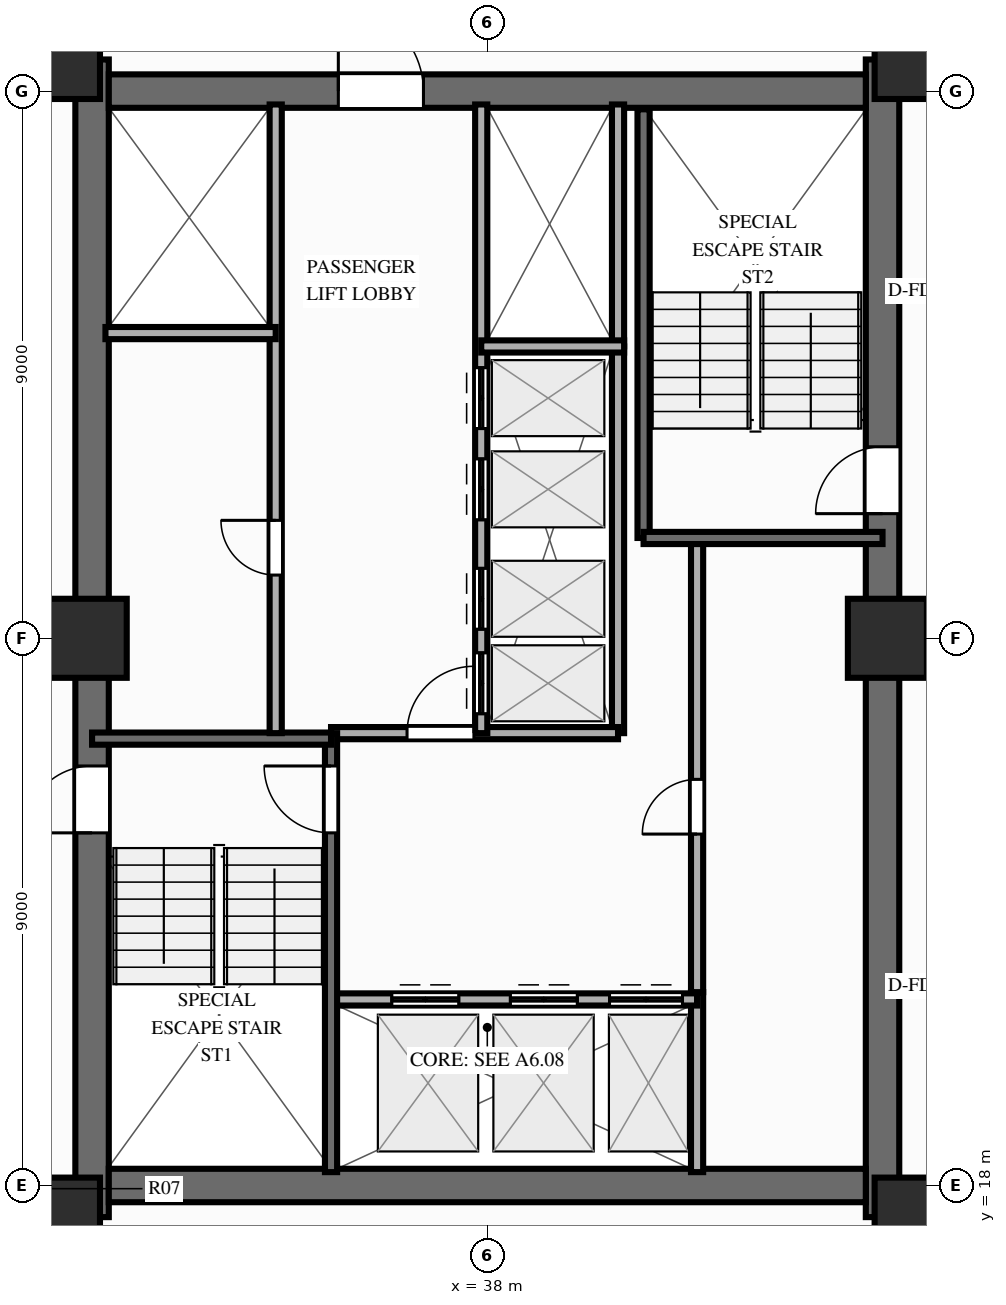
"""IFC4 building model, lengths in metres.
Left out: names, types, materials, properties, quantities, classifications, styles, units other than length and angle.
Written with IfcOpenShell. Run it as: python <this file> out.ifc"""

import sys

from ifc_helpers import new_model, si_unit, direction, frame, frame_2d, origin, origin_2d, place, context, subcontext, project, spatial, rectangle, extrude, source, transform, mapped, element, fill, save


model = new_model("IFC4")
c1 = context("Model", 3, precision=1e-05, world=origin(), true_north=direction((0.0, 1.0)))
c2 = subcontext(c1, "Body", "Model", "MODEL_VIEW")
j1 = project(units=[si_unit("LENGTHUNIT", "METRE"), si_unit("PLANEANGLEUNIT", "RADIAN")], contexts=[c1])
p1 = place(None, origin())
s1 = spatial("IfcSite", under=j1, at=p1, CompositionType="ELEMENT")
p2 = place(p1, origin())
s2 = spatial("IfcBuilding", under=s1, at=p2, CompositionType="ELEMENT")
p3 = place(p2, frame((0.0, 0.0, 135.75)))
s3 = spatial("IfcBuildingStorey", under=s2, at=p3, CompositionType="ELEMENT", Elevation=135.75)
p4 = place(p3, frame((31.5, 17.48, 0.0), z_axis=(0.0, 0.0, 1.0), x_axis=(0.0, 1.0, 0.0)))
e1 = element("IfcWall", 1, at=p4, inside=s3, PredefinedType="SHEAR", context=c2, shape_type="SweptSolid", body=[
    extrude(rectangle(XDim=19.04, YDim=0.55, at=frame_2d((9.52, 0.0))), origin(), (0.0, 0.0, 1.0), 3.0),
])
p5 = place(p4, frame((6.32, 0.0, 0.0)))
e2 = element("IfcOpeningElement", 2, at=p5, cuts=e1, PredefinedType="OPENING", context=c2, shape_type="SweptSolid", body=[
    extrude(rectangle(XDim=1.1, YDim=2.15, at=frame_2d((0.55, 1.075))), frame((0.0, 0.287, 0.0), z_axis=(0.0, -1.0, 0.0), x_axis=(1.0, 0.0, 0.0)), (0.0, 0.0, 1.0), 0.574),
])
p6 = place(p3, frame((44.5, 17.48, 0.0), z_axis=(0.0, 0.0, 1.0), x_axis=(0.0, 1.0, 0.0)))
e3 = element("IfcWall", 3, at=p6, inside=s3, PredefinedType="SHEAR", context=c2, shape_type="SweptSolid", body=[
    extrude(rectangle(XDim=19.04, YDim=0.55, at=frame_2d((9.52, 0.0))), origin(), (0.0, 0.0, 1.0), 3.0),
])
p7 = place(p6, frame((12.67, 0.0, 0.0), z_axis=(0.0, 0.0, 1.0), x_axis=(-1.0, 0.0, 0.0)))
e4 = element("IfcOpeningElement", 4, at=p7, cuts=e3, PredefinedType="OPENING", context=c2, shape_type="SweptSolid", body=[
    extrude(rectangle(XDim=1.1, YDim=2.15, at=frame_2d((0.55, 1.075))), frame((0.0, 0.287, 0.0), z_axis=(0.0, -1.0, 0.0), x_axis=(1.0, 0.0, 0.0)), (0.0, 0.0, 1.0), 0.574),
])
p8 = place(p3, frame((31.775, 18.0, 0.0), z_axis=(0.0, 0.0, 1.0), x_axis=(1.0, 0.0, 0.0)))
e5 = element("IfcWall", 5, at=p8, inside=s3, PredefinedType="SHEAR", context=c2, shape_type="SweptSolid", body=[
    extrude(rectangle(XDim=12.45, YDim=0.55, at=frame_2d((6.225, 0.0))), origin(), (0.0, 0.0, 1.0), 3.0),
])
p9 = place(p3, frame((31.775, 36.0, 0.0), z_axis=(0.0, 0.0, 1.0), x_axis=(1.0, 0.0, 0.0)))
e6 = element("IfcWall", 6, at=p9, inside=s3, PredefinedType="SHEAR", context=c2, shape_type="SweptSolid", body=[
    extrude(rectangle(XDim=12.45, YDim=0.55, at=frame_2d((6.225, 0.0))), origin(), (0.0, 0.0, 1.0), 3.0),
])
p10 = place(p9, frame((5.175, 0.0, 0.0), z_axis=(0.0, 0.0, 1.0), x_axis=(-1.0, 0.0, 0.0)))
e7 = element("IfcOpeningElement", 7, at=p10, cuts=e6, PredefinedType="OPENING", context=c2, shape_type="SweptSolid", body=[
    extrude(rectangle(XDim=1.4, YDim=2.15, at=frame_2d((0.7, 1.075))), frame((0.0, 0.287, 0.0), z_axis=(0.0, -1.0, 0.0), x_axis=(1.0, 0.0, 0.0)), (0.0, 0.0, 1.0), 0.574),
])
m1 = source(origin(), c2, "Body", "SweptSolid", [
    extrude(rectangle(XDim=1.3, YDim=1.3, at=origin_2d()), origin(), (0.0, 0.0, 1.0), 3.0),
])
for number, where, z_axis, x_axis in (
    (8, (30.98, 17.48, 0.0), (0.0, 0.0, 1.0), (1.0, 0.0, 0.0)),
    (9, (45.02, 17.48, 0.0), (0.0, 0.0, 1.0), (1.0, 0.0, 0.0)),
    (10, (30.98, 36.52, 0.0), (0.0, 0.0, 1.0), (1.0, 0.0, 0.0)),
    (11, (45.02, 36.52, 0.0), (0.0, 0.0, 1.0), (1.0, 0.0, 0.0)),
    (12, (31.42, 27.0, 0.0), (0.0, 0.0, 1.0), (1.0, 0.0, 0.0)),
    (13, (44.58, 27.0, 0.0), (0.0, 0.0, 1.0), (1.0, 0.0, 0.0)),
):
    element("IfcColumn", number, at=place(p3, frame(where, z_axis=z_axis, x_axis=x_axis)), inside=s3, PredefinedType="COLUMN", context=c2, shape_type="MappedRepresentation", body=[
        mapped(m1, transform((0.0, 0.0, 0.0), scale=1.0)),
    ])
p11 = place(p3, frame((41.45, 18.22, 0.0), z_axis=(0.0, 0.0, 1.0), x_axis=(0.0, 1.0, 0.0)))
e14 = element("IfcWall", 14, at=p11, inside=s3, PredefinedType="PARTITIONING", context=c2, shape_type="SweptSolid", body=[
    extrude(rectangle(XDim=2.96, YDim=0.2, at=frame_2d((1.48, 0.0))), origin(), (0.0, 0.0, 1.0), 2.79),
])
p12 = place(p3, frame((41.45, 21.18, 0.0), z_axis=(0.0, 0.0, 1.0), x_axis=(0.0, 1.0, 0.0)))
e15 = element("IfcWall", 15, at=p12, inside=s3, PredefinedType="PARTITIONING", context=c2, shape_type="SweptSolid", body=[
    extrude(rectangle(XDim=7.42, YDim=0.2, at=frame_2d((3.71, 0.0))), origin(), (0.0, 0.0, 1.0), 2.79),
])
p13 = place(p12, frame((2.6, 0.0, 0.0)))
e16 = element("IfcOpeningElement", 16, at=p13, cuts=e15, PredefinedType="OPENING", context=c2, shape_type="SweptSolid", body=[
    extrude(rectangle(XDim=0.9, YDim=2.1, at=frame_2d((0.45, 1.05))), frame((0.0, 0.112, 0.0), z_axis=(0.0, -1.0, 0.0), x_axis=(1.0, 0.0, 0.0)), (0.0, 0.0, 1.0), 0.224),
])
p14 = place(p3, frame((40.15, 25.44, 0.0), z_axis=(0.0, 0.0, 1.0), x_axis=(0.0, 1.0, 0.0)))
e17 = element("IfcWall", 17, at=p14, inside=s3, PredefinedType="PARTITIONING", context=c2, shape_type="SweptSolid", body=[
    extrude(rectangle(XDim=6.36, YDim=0.2, at=frame_2d((3.18, 0.0))), origin(), (0.0, 0.0, 1.0), 2.79),
])
p15 = place(p3, frame((40.15, 31.8, 0.0), z_axis=(0.0, 0.0, 1.0), x_axis=(0.0, 1.0, 0.0)))
e18 = element("IfcWall", 18, at=p15, inside=s3, PredefinedType="PARTITIONING", context=c2, shape_type="SweptSolid", body=[
    extrude(rectangle(XDim=3.98, YDim=0.2, at=frame_2d((1.99, 0.0))), origin(), (0.0, 0.0, 1.0), 2.79),
])
p16 = place(p3, frame((35.43, 21.06, 0.0), z_axis=(0.0, 0.0, 1.0), x_axis=(1.0, 0.0, 0.0)))
e19 = element("IfcWall", 19, at=p16, inside=s3, PredefinedType="PARTITIONING", context=c2, shape_type="SweptSolid", body=[
    extrude(rectangle(XDim=6.02, YDim=0.2, at=frame_2d((3.01, 0.0))), origin(), (0.0, 0.0, 1.0), 2.79),
])
p17 = place(p16, frame((1.0, 0.0, 0.0)))
e20 = element("IfcOpeningElement", 20, at=p17, cuts=e19, PredefinedType="OPENING", context=c2, shape_type="SweptSolid", body=[
    extrude(rectangle(XDim=1.1, YDim=2.15, at=frame_2d((0.55, 1.075))), frame((0.0, 0.112, 0.0), z_axis=(0.0, -1.0, 0.0), x_axis=(1.0, 0.0, 0.0)), (0.0, 0.0, 1.0), 0.224),
])
p18 = place(p16, frame((2.95, 0.0, 0.0)))
e21 = element("IfcOpeningElement", 21, at=p18, cuts=e19, PredefinedType="OPENING", context=c2, shape_type="SweptSolid", body=[
    extrude(rectangle(XDim=1.1, YDim=2.15, at=frame_2d((0.55, 1.075))), frame((0.0, 0.112, 0.0), z_axis=(0.0, -1.0, 0.0), x_axis=(1.0, 0.0, 0.0)), (0.0, 0.0, 1.0), 0.224),
])
p19 = place(p16, frame((4.58, 0.0, 0.0)))
e22 = element("IfcOpeningElement", 22, at=p19, cuts=e19, PredefinedType="OPENING", context=c2, shape_type="SweptSolid", body=[
    extrude(rectangle(XDim=1.2, YDim=2.15, at=frame_2d((0.6, 1.075))), frame((0.0, 0.112, 0.0), z_axis=(0.0, -1.0, 0.0), x_axis=(1.0, 0.0, 0.0)), (0.0, 0.0, 1.0), 0.224),
])
p20 = place(p3, frame((35.43, 25.44, 0.0), z_axis=(0.0, 0.0, 1.0), x_axis=(1.0, 0.0, 0.0)))
e23 = element("IfcWall", 23, at=p20, inside=s3, PredefinedType="PARTITIONING", context=c2, shape_type="SweptSolid", body=[
    extrude(rectangle(XDim=4.72, YDim=0.2, at=frame_2d((2.36, 0.0))), origin(), (0.0, 0.0, 1.0), 2.79),
])
p21 = place(p20, frame((1.25, 0.0, 0.0)))
e24 = element("IfcOpeningElement", 24, at=p21, cuts=e23, PredefinedType="OPENING", context=c2, shape_type="SweptSolid", body=[
    extrude(rectangle(XDim=1.1, YDim=2.15, at=frame_2d((0.55, 1.075))), frame((0.0, 0.112, 0.0), z_axis=(0.0, -1.0, 0.0), x_axis=(1.0, 0.0, 0.0)), (0.0, 0.0, 1.0), 0.224),
])
p22 = place(p3, frame((35.43, 18.22, 0.0), z_axis=(0.0, 0.0, 1.0), x_axis=(0.0, 1.0, 0.0)))
e25 = element("IfcWall", 25, at=p22, inside=s3, PredefinedType="SOLIDWALL", context=c2, shape_type="SweptSolid", body=[
    extrude(rectangle(XDim=7.22, YDim=0.2, at=frame_2d((3.61, 0.0))), origin(), (0.0, 0.0, 1.0), 2.79),
])
p23 = place(p22, frame((6.68, 0.0, 0.0), z_axis=(0.0, 0.0, 1.0), x_axis=(-1.0, 0.0, 0.0)))
e26 = element("IfcOpeningElement", 26, at=p23, cuts=e25, PredefinedType="OPENING", context=c2, shape_type="SweptSolid", body=[
    extrude(rectangle(XDim=1.1, YDim=2.15, at=frame_2d((0.55, 1.075))), frame((0.0, 0.112, 0.0), z_axis=(0.0, -1.0, 0.0), x_axis=(1.0, 0.0, 0.0)), (0.0, 0.0, 1.0), 0.224),
])
p24 = place(p3, frame((31.5, 25.35, 0.0), z_axis=(0.0, 0.0, 1.0), x_axis=(1.0, 0.0, 0.0)))
e27 = element("IfcWall", 27, at=p24, inside=s3, PredefinedType="SOLIDWALL", context=c2, shape_type="SweptSolid", body=[
    extrude(rectangle(XDim=3.93, YDim=0.2, at=frame_2d((1.965, 0.0))), origin(), (0.0, 0.0, 1.0), 2.79),
])
p25 = place(p3, frame((40.57, 28.65, 0.0), z_axis=(0.0, 0.0, 1.0), x_axis=(0.0, 1.0, 0.0)))
e28 = element("IfcWall", 28, at=p25, inside=s3, PredefinedType="SOLIDWALL", context=c2, shape_type="SweptSolid", body=[
    extrude(rectangle(XDim=7.05, YDim=0.2, at=frame_2d((3.525, 0.0))), origin(), (0.0, 0.0, 1.0), 2.79),
])
p26 = place(p3, frame((40.57, 28.65, 0.0), z_axis=(0.0, 0.0, 1.0), x_axis=(1.0, 0.0, 0.0)))
e29 = element("IfcWall", 29, at=p26, inside=s3, PredefinedType="SOLIDWALL", context=c2, shape_type="SweptSolid", body=[
    extrude(rectangle(XDim=3.93, YDim=0.2, at=frame_2d((1.965, 0.0))), origin(), (0.0, 0.0, 1.0), 2.79),
])
p27 = place(p3, frame((34.52, 25.44, 0.0), z_axis=(0.0, 0.0, 1.0), x_axis=(0.0, 1.0, 0.0)))
e30 = element("IfcWall", 30, at=p27, inside=s3, PredefinedType="PARTITIONING", context=c2, shape_type="SweptSolid", body=[
    extrude(rectangle(XDim=10.34, YDim=0.2, at=frame_2d((5.17, 0.0))), origin(), (0.0, 0.0, 1.0), 2.79),
])
p28 = place(p27, frame((2.6, 0.0, 0.0)))
e31 = element("IfcOpeningElement", 31, at=p28, cuts=e30, PredefinedType="OPENING", context=c2, shape_type="SweptSolid", body=[
    extrude(rectangle(XDim=0.9, YDim=2.1, at=frame_2d((0.45, 1.05))), frame((0.0, 0.112, 0.0), z_axis=(0.0, -1.0, 0.0), x_axis=(1.0, 0.0, 0.0)), (0.0, 0.0, 1.0), 0.224),
])
p29 = place(p3, frame((31.72, 32.02, 0.0), z_axis=(0.0, 0.0, 1.0), x_axis=(1.0, 0.0, 0.0)))
e32 = element("IfcWall", 32, at=p29, inside=s3, PredefinedType="PARTITIONING", context=c2, shape_type="SweptSolid", body=[
    extrude(rectangle(XDim=2.8, YDim=0.2, at=frame_2d((1.4, 0.0))), origin(), (0.0, 0.0, 1.0), 2.79),
])
p30 = place(p3, frame((37.9, 25.44, 0.0), z_axis=(0.0, 0.0, 1.0), x_axis=(0.0, 1.0, 0.0)))
e33 = element("IfcWall", 33, at=p30, inside=s3, PredefinedType="PARTITIONING", context=c2, shape_type="SweptSolid", body=[
    extrude(rectangle(XDim=10.34, YDim=0.2, at=frame_2d((5.17, 0.0))), origin(), (0.0, 0.0, 1.0), 2.79),
])
p31 = place(p30, frame((0.32, 0.0, 0.0)))
e34 = element("IfcOpeningElement", 34, at=p31, cuts=e33, PredefinedType="OPENING", context=c2, shape_type="SweptSolid", body=[
    extrude(rectangle(XDim=1.0, YDim=2.15, at=frame_2d((0.5, 1.075))), frame((0.0, 0.112, 0.0), z_axis=(0.0, -1.0, 0.0), x_axis=(1.0, 0.0, 0.0)), (0.0, 0.0, 1.0), 0.224),
])
p32 = place(p30, frame((1.71, 0.0, 0.0)))
e35 = element("IfcOpeningElement", 35, at=p32, cuts=e33, PredefinedType="OPENING", context=c2, shape_type="SweptSolid", body=[
    extrude(rectangle(XDim=1.0, YDim=2.15, at=frame_2d((0.5, 1.075))), frame((0.0, 0.112, 0.0), z_axis=(0.0, -1.0, 0.0), x_axis=(1.0, 0.0, 0.0)), (0.0, 0.0, 1.0), 0.224),
])
p33 = place(p30, frame((3.51, 0.0, 0.0)))
e36 = element("IfcOpeningElement", 36, at=p33, cuts=e33, PredefinedType="OPENING", context=c2, shape_type="SweptSolid", body=[
    extrude(rectangle(XDim=1.0, YDim=2.15, at=frame_2d((0.5, 1.075))), frame((0.0, 0.112, 0.0), z_axis=(0.0, -1.0, 0.0), x_axis=(1.0, 0.0, 0.0)), (0.0, 0.0, 1.0), 0.224),
])
p34 = place(p30, frame((5.01, 0.0, 0.0)))
e37 = element("IfcOpeningElement", 37, at=p34, cuts=e33, PredefinedType="OPENING", context=c2, shape_type="SweptSolid", body=[
    extrude(rectangle(XDim=1.0, YDim=2.15, at=frame_2d((0.5, 1.075))), frame((0.0, 0.112, 0.0), z_axis=(0.0, -1.0, 0.0), x_axis=(1.0, 0.0, 0.0)), (0.0, 0.0, 1.0), 0.224),
])
p35 = place(p3, frame((37.9, 31.8, 0.0), z_axis=(0.0, 0.0, 1.0), x_axis=(1.0, 0.0, 0.0)))
e38 = element("IfcWall", 38, at=p35, inside=s3, PredefinedType="PARTITIONING", context=c2, shape_type="SweptSolid", body=[
    extrude(rectangle(XDim=2.35, YDim=0.2, at=frame_2d((1.175, 0.0))), origin(), (0.0, 0.0, 1.0), 2.79),
])
m2 = source(origin(), c2, "Body", "SweptSolid", [
    extrude(rectangle(XDim=1.1, YDim=2.15, at=frame_2d((0.55, 1.075))), frame((0.0, 0.025, 0.0), z_axis=(0.0, -1.0, 0.0), x_axis=(1.0, 0.0, 0.0)), (0.0, 0.0, 1.0), 0.05),
])
p36 = place(p5, origin())
e39 = element("IfcDoor", 39, at=p36, inside=s3, OperationType="SINGLE_SWING_LEFT", PredefinedType="DOOR", context=c2, shape_type="MappedRepresentation", body=[
    mapped(m2, transform((0.0, 0.0, 0.0), scale=1.0)),
])
fill(e2, e39)
p37 = place(p7, origin())
e40 = element("IfcDoor", 40, at=p37, inside=s3, OperationType="SINGLE_SWING_RIGHT", PredefinedType="DOOR", context=c2, shape_type="MappedRepresentation", body=[
    mapped(m2, transform((0.0, 0.0, 0.0), scale=1.0)),
])
fill(e4, e40)
m3 = source(origin(), c2, "Body", "SweptSolid", [
    extrude(rectangle(XDim=1.4, YDim=2.15, at=frame_2d((0.7, 1.075))), frame((0.0, 0.025, 0.0), z_axis=(0.0, -1.0, 0.0), x_axis=(1.0, 0.0, 0.0)), (0.0, 0.0, 1.0), 0.05),
])
p38 = place(p10, origin())
e41 = element("IfcDoor", 41, at=p38, inside=s3, OperationType="SINGLE_SWING_RIGHT", PredefinedType="DOOR", context=c2, shape_type="MappedRepresentation", body=[
    mapped(m3, transform((0.0, 0.0, 0.0), scale=1.0)),
])
fill(e7, e41)
m4 = source(origin(), c2, "Body", "SweptSolid", [
    extrude(rectangle(XDim=0.9, YDim=2.1, at=frame_2d((0.45, 1.05))), frame((0.0, 0.025, 0.0), z_axis=(0.0, -1.0, 0.0), x_axis=(1.0, 0.0, 0.0)), (0.0, 0.0, 1.0), 0.05),
])
p39 = place(p13, origin())
e42 = element("IfcDoor", 42, at=p39, inside=s3, OperationType="SINGLE_SWING_LEFT", PredefinedType="DOOR", context=c2, shape_type="MappedRepresentation", body=[
    mapped(m4, transform((0.0, 0.0, 0.0), scale=1.0)),
])
fill(e16, e42)
p40 = place(p17, origin())
e43 = element("IfcDoor", 43, at=p40, inside=s3, OperationType="DOUBLE_DOOR_SLIDING", PredefinedType="DOOR", context=c2, shape_type="MappedRepresentation", body=[
    mapped(m2, transform((0.0, 0.0, 0.0), scale=1.0)),
])
fill(e20, e43)
p41 = place(p18, origin())
e44 = element("IfcDoor", 44, at=p41, inside=s3, OperationType="DOUBLE_DOOR_SLIDING", PredefinedType="DOOR", context=c2, shape_type="MappedRepresentation", body=[
    mapped(m2, transform((0.0, 0.0, 0.0), scale=1.0)),
])
fill(e21, e44)
m5 = source(origin(), c2, "Body", "SweptSolid", [
    extrude(rectangle(XDim=1.2, YDim=2.15, at=frame_2d((0.6, 1.075))), frame((0.0, 0.025, 0.0), z_axis=(0.0, -1.0, 0.0), x_axis=(1.0, 0.0, 0.0)), (0.0, 0.0, 1.0), 0.05),
])
p42 = place(p19, origin())
e45 = element("IfcDoor", 45, at=p42, inside=s3, OperationType="DOUBLE_DOOR_SLIDING", PredefinedType="DOOR", context=c2, shape_type="MappedRepresentation", body=[
    mapped(m5, transform((0.0, 0.0, 0.0), scale=1.0)),
])
fill(e22, e45)
p43 = place(p21, origin())
e46 = element("IfcDoor", 46, at=p43, inside=s3, OperationType="SINGLE_SWING_RIGHT", PredefinedType="DOOR", context=c2, shape_type="MappedRepresentation", body=[
    mapped(m2, transform((0.0, 0.0, 0.0), scale=1.0)),
])
fill(e24, e46)
p44 = place(p23, origin())
e47 = element("IfcDoor", 47, at=p44, inside=s3, OperationType="SINGLE_SWING_LEFT", PredefinedType="DOOR", context=c2, shape_type="MappedRepresentation", body=[
    mapped(m2, transform((0.0, 0.0, 0.0), scale=1.0)),
])
fill(e26, e47)
p45 = place(p28, origin())
e48 = element("IfcDoor", 48, at=p45, inside=s3, OperationType="SINGLE_SWING_RIGHT", PredefinedType="DOOR", context=c2, shape_type="MappedRepresentation", body=[
    mapped(m4, transform((0.0, 0.0, 0.0), scale=1.0)),
])
fill(e31, e48)
m6 = source(origin(), c2, "Body", "SweptSolid", [
    extrude(rectangle(XDim=1.0, YDim=2.15, at=frame_2d((0.5, 1.075))), frame((0.0, 0.025, 0.0), z_axis=(0.0, -1.0, 0.0), x_axis=(1.0, 0.0, 0.0)), (0.0, 0.0, 1.0), 0.05),
])
p46 = place(p31, origin())
e49 = element("IfcDoor", 49, at=p46, inside=s3, OperationType="DOUBLE_DOOR_SLIDING", PredefinedType="DOOR", context=c2, shape_type="MappedRepresentation", body=[
    mapped(m6, transform((0.0, 0.0, 0.0), scale=1.0)),
])
fill(e34, e49)
p47 = place(p32, origin())
e50 = element("IfcDoor", 50, at=p47, inside=s3, OperationType="DOUBLE_DOOR_SLIDING", PredefinedType="DOOR", context=c2, shape_type="MappedRepresentation", body=[
    mapped(m6, transform((0.0, 0.0, 0.0), scale=1.0)),
])
fill(e35, e50)
p48 = place(p33, origin())
e51 = element("IfcDoor", 51, at=p48, inside=s3, OperationType="DOUBLE_DOOR_SLIDING", PredefinedType="DOOR", context=c2, shape_type="MappedRepresentation", body=[
    mapped(m6, transform((0.0, 0.0, 0.0), scale=1.0)),
])
fill(e36, e51)
p49 = place(p34, origin())
e52 = element("IfcDoor", 52, at=p49, inside=s3, OperationType="DOUBLE_DOOR_SLIDING", PredefinedType="DOOR", context=c2, shape_type="MappedRepresentation", body=[
    mapped(m6, transform((0.0, 0.0, 0.0), scale=1.0)),
])
fill(e37, e52)
save(model, sys.argv[1])
